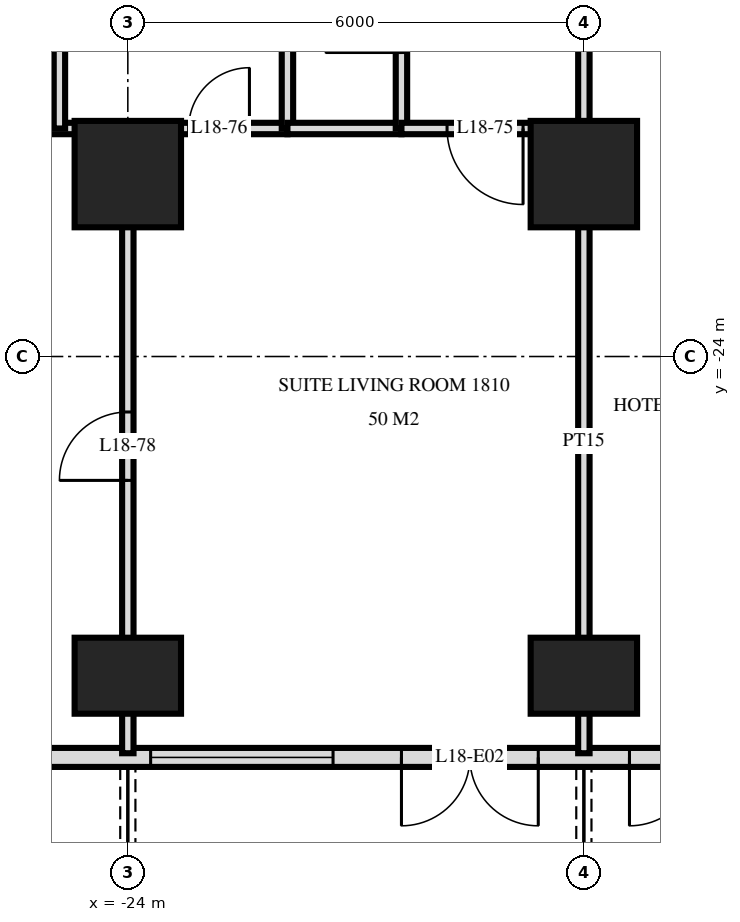
"""IFC4 building model, lengths in metres.
Left out: names, types, materials, properties, quantities, classifications, styles, units other than length and angle.
Written with IfcOpenShell. Run it as: python <this file> out.ifc"""

import sys

from ifc_helpers import new_model, si_unit, direction, frame, frame_2d, origin, origin_2d, place, context, subcontext, project, spatial, rectangle, extrude, element, fill, save


model = new_model("IFC4")
c1 = context("Model", 3, precision=1e-05, world=origin(), true_north=direction((0.0, 1.0)))
c2 = subcontext(c1, "Body", "Model", "MODEL_VIEW")
j1 = project(units=[si_unit("LENGTHUNIT", "METRE"), si_unit("PLANEANGLEUNIT", "RADIAN")], contexts=[c1])
p1 = place(None, origin())
s1 = spatial("IfcSite", under=j1, at=p1, CompositionType="ELEMENT")
p2 = place(p1, origin())
s2 = spatial("IfcBuilding", under=s1, at=p2, CompositionType="ELEMENT")
p3 = place(p2, frame((0.0, 0.0, 74.4)))
s3 = spatial("IfcBuildingStorey", under=s2, at=p3, CompositionType="ELEMENT", Elevation=74.4)
p4 = place(p3, frame((-24.0, -28.2, 0.0), z_axis=(0.0, 0.0, 1.0), x_axis=(1.0, 0.0, 0.0)))
e1 = element("IfcColumn", 1, at=p4, inside=s3, PredefinedType="COLUMN", context=c2, shape_type="SweptSolid", body=[
    extrude(rectangle(XDim=1.4, YDim=1.0, at=origin_2d()), origin(), (0.0, 0.0, 1.0), 3.6),
])
p5 = place(p3, frame((-24.0, -21.6, 0.0), z_axis=(0.0, 0.0, 1.0), x_axis=(1.0, 0.0, 0.0)))
e2 = element("IfcColumn", 2, at=p5, inside=s3, PredefinedType="COLUMN", context=c2, shape_type="SweptSolid", body=[
    extrude(rectangle(XDim=1.4, YDim=1.4, at=origin_2d()), origin(), (0.0, 0.0, 1.0), 3.6),
])
p6 = place(p3, frame((-18.0, -28.2, 0.0), z_axis=(0.0, 0.0, 1.0), x_axis=(1.0, 0.0, 0.0)))
e3 = element("IfcColumn", 3, at=p6, inside=s3, PredefinedType="COLUMN", context=c2, shape_type="SweptSolid", body=[
    extrude(rectangle(XDim=1.4, YDim=1.0, at=origin_2d()), origin(), (0.0, 0.0, 1.0), 3.6),
])
p7 = place(p3, frame((-18.0, -21.6, 0.0), z_axis=(0.0, 0.0, 1.0), x_axis=(1.0, 0.0, 0.0)))
e4 = element("IfcColumn", 4, at=p7, inside=s3, PredefinedType="COLUMN", context=c2, shape_type="SweptSolid", body=[
    extrude(rectangle(XDim=1.4, YDim=1.4, at=origin_2d()), origin(), (0.0, 0.0, 1.0), 3.6),
])
p8 = place(p3, frame((-28.775, -29.275, 0.0), z_axis=(0.0, 0.0, 1.0), x_axis=(1.0, 0.0, 0.0)))
e5 = element("IfcWall", 5, at=p8, inside=s3, PredefinedType="SOLIDWALL", context=c2, shape_type="SweptSolid", body=[
    extrude(rectangle(XDim=57.551, YDim=0.25, at=frame_2d((28.775, 0.0))), origin(), (0.0, 0.0, 1.0), 3.32),
])
p9 = place(p8, frame((0.575, 0.0, 0.0)))
e6 = element("IfcOpeningElement", 6, at=p9, cuts=e5, PredefinedType="OPENING", context=c2, shape_type="SweptSolid", body=[
    extrude(rectangle(XDim=1.8, YDim=2.4, at=frame_2d((0.9, 1.2))), frame((0.0, 0.135, 0.0), z_axis=(0.0, -1.0, 0.0), x_axis=(1.0, 0.0, 0.0)), (0.0, 0.0, 1.0), 0.27),
])
p10 = place(p8, frame((5.075, 0.0, 0.3)))
e7 = element("IfcOpeningElement", 7, at=p10, cuts=e5, PredefinedType="OPENING", context=c2, shape_type="SweptSolid", body=[
    extrude(rectangle(XDim=2.4, YDim=2.1, at=frame_2d((1.2, 1.05))), frame((0.0, 0.135, 0.0), z_axis=(0.0, -1.0, 0.0), x_axis=(1.0, 0.0, 0.0)), (0.0, 0.0, 1.0), 0.27),
])
p11 = place(p8, frame((8.375, 0.0, 0.0)))
e8 = element("IfcOpeningElement", 8, at=p11, cuts=e5, PredefinedType="OPENING", context=c2, shape_type="SweptSolid", body=[
    extrude(rectangle(XDim=1.8, YDim=2.4, at=frame_2d((0.9, 1.2))), frame((0.0, 0.135, 0.0), z_axis=(0.0, -1.0, 0.0), x_axis=(1.0, 0.0, 0.0)), (0.0, 0.0, 1.0), 0.27),
])
p12 = place(p8, frame((11.375, 0.0, 0.0)))
e9 = element("IfcOpeningElement", 9, at=p12, cuts=e5, PredefinedType="OPENING", context=c2, shape_type="SweptSolid", body=[
    extrude(rectangle(XDim=1.8, YDim=2.4, at=frame_2d((0.9, 1.2))), frame((0.0, 0.135, 0.0), z_axis=(0.0, -1.0, 0.0), x_axis=(1.0, 0.0, 0.0)), (0.0, 0.0, 1.0), 0.27),
])
p13 = place(p8, frame((14.075, 0.0, 0.3)))
e10 = element("IfcOpeningElement", 10, at=p13, cuts=e5, PredefinedType="OPENING", context=c2, shape_type="SweptSolid", body=[
    extrude(rectangle(XDim=2.4, YDim=2.1, at=frame_2d((1.2, 1.05))), frame((0.0, 0.135, 0.0), z_axis=(0.0, -1.0, 0.0), x_axis=(1.0, 0.0, 0.0)), (0.0, 0.0, 1.0), 0.27),
])
p14 = place(p8, frame((17.375, 0.0, 0.0)))
e11 = element("IfcOpeningElement", 11, at=p14, cuts=e5, PredefinedType="OPENING", context=c2, shape_type="SweptSolid", body=[
    extrude(rectangle(XDim=1.8, YDim=2.4, at=frame_2d((0.9, 1.2))), frame((0.0, 0.135, 0.0), z_axis=(0.0, -1.0, 0.0), x_axis=(1.0, 0.0, 0.0)), (0.0, 0.0, 1.0), 0.27),
])
p15 = place(p8, frame((20.075, 0.0, 0.3)))
e12 = element("IfcOpeningElement", 12, at=p15, cuts=e5, PredefinedType="OPENING", context=c2, shape_type="SweptSolid", body=[
    extrude(rectangle(XDim=2.4, YDim=2.1, at=frame_2d((1.2, 1.05))), frame((0.0, 0.135, 0.0), z_axis=(0.0, -1.0, 0.0), x_axis=(1.0, 0.0, 0.0)), (0.0, 0.0, 1.0), 0.27),
])
p16 = place(p8, frame((23.075, 0.0, 0.3)))
e13 = element("IfcOpeningElement", 13, at=p16, cuts=e5, PredefinedType="OPENING", context=c2, shape_type="SweptSolid", body=[
    extrude(rectangle(XDim=2.4, YDim=2.1, at=frame_2d((1.2, 1.05))), frame((0.0, 0.135, 0.0), z_axis=(0.0, -1.0, 0.0), x_axis=(1.0, 0.0, 0.0)), (0.0, 0.0, 1.0), 0.27),
])
p17 = place(p8, frame((26.375, 0.0, 0.0)))
e14 = element("IfcOpeningElement", 14, at=p17, cuts=e5, PredefinedType="OPENING", context=c2, shape_type="SweptSolid", body=[
    extrude(rectangle(XDim=1.8, YDim=2.4, at=frame_2d((0.9, 1.2))), frame((0.0, 0.135, 0.0), z_axis=(0.0, -1.0, 0.0), x_axis=(1.0, 0.0, 0.0)), (0.0, 0.0, 1.0), 0.27),
])
p18 = place(p8, frame((29.375, 0.0, 0.0)))
e15 = element("IfcOpeningElement", 15, at=p18, cuts=e5, PredefinedType="OPENING", context=c2, shape_type="SweptSolid", body=[
    extrude(rectangle(XDim=1.8, YDim=2.4, at=frame_2d((0.9, 1.2))), frame((0.0, 0.135, 0.0), z_axis=(0.0, -1.0, 0.0), x_axis=(1.0, 0.0, 0.0)), (0.0, 0.0, 1.0), 0.27),
])
p19 = place(p8, frame((32.075, 0.0, 0.3)))
e16 = element("IfcOpeningElement", 16, at=p19, cuts=e5, PredefinedType="OPENING", context=c2, shape_type="SweptSolid", body=[
    extrude(rectangle(XDim=2.4, YDim=2.1, at=frame_2d((1.2, 1.05))), frame((0.0, 0.135, 0.0), z_axis=(0.0, -1.0, 0.0), x_axis=(1.0, 0.0, 0.0)), (0.0, 0.0, 1.0), 0.27),
])
p20 = place(p8, frame((35.375, 0.0, 0.0)))
e17 = element("IfcOpeningElement", 17, at=p20, cuts=e5, PredefinedType="OPENING", context=c2, shape_type="SweptSolid", body=[
    extrude(rectangle(XDim=1.8, YDim=2.4, at=frame_2d((0.9, 1.2))), frame((0.0, 0.135, 0.0), z_axis=(0.0, -1.0, 0.0), x_axis=(1.0, 0.0, 0.0)), (0.0, 0.0, 1.0), 0.27),
])
p21 = place(p8, frame((38.075, 0.0, 0.3)))
e18 = element("IfcOpeningElement", 18, at=p21, cuts=e5, PredefinedType="OPENING", context=c2, shape_type="SweptSolid", body=[
    extrude(rectangle(XDim=2.4, YDim=2.1, at=frame_2d((1.2, 1.05))), frame((0.0, 0.135, 0.0), z_axis=(0.0, -1.0, 0.0), x_axis=(1.0, 0.0, 0.0)), (0.0, 0.0, 1.0), 0.27),
])
p22 = place(p8, frame((41.075, 0.0, 0.3)))
e19 = element("IfcOpeningElement", 19, at=p22, cuts=e5, PredefinedType="OPENING", context=c2, shape_type="SweptSolid", body=[
    extrude(rectangle(XDim=2.4, YDim=2.1, at=frame_2d((1.2, 1.05))), frame((0.0, 0.135, 0.0), z_axis=(0.0, -1.0, 0.0), x_axis=(1.0, 0.0, 0.0)), (0.0, 0.0, 1.0), 0.27),
])
p23 = place(p8, frame((44.375, 0.0, 0.0)))
e20 = element("IfcOpeningElement", 20, at=p23, cuts=e5, PredefinedType="OPENING", context=c2, shape_type="SweptSolid", body=[
    extrude(rectangle(XDim=1.8, YDim=2.4, at=frame_2d((0.9, 1.2))), frame((0.0, 0.135, 0.0), z_axis=(0.0, -1.0, 0.0), x_axis=(1.0, 0.0, 0.0)), (0.0, 0.0, 1.0), 0.27),
])
p24 = place(p8, frame((47.075, 0.0, 0.3)))
e21 = element("IfcOpeningElement", 21, at=p24, cuts=e5, PredefinedType="OPENING", context=c2, shape_type="SweptSolid", body=[
    extrude(rectangle(XDim=2.4, YDim=2.1, at=frame_2d((1.2, 1.05))), frame((0.0, 0.135, 0.0), z_axis=(0.0, -1.0, 0.0), x_axis=(1.0, 0.0, 0.0)), (0.0, 0.0, 1.0), 0.27),
])
p25 = place(p8, frame((50.375, 0.0, 0.0)))
e22 = element("IfcOpeningElement", 22, at=p25, cuts=e5, PredefinedType="OPENING", context=c2, shape_type="SweptSolid", body=[
    extrude(rectangle(XDim=1.8, YDim=2.4, at=frame_2d((0.9, 1.2))), frame((0.0, 0.135, 0.0), z_axis=(0.0, -1.0, 0.0), x_axis=(1.0, 0.0, 0.0)), (0.0, 0.0, 1.0), 0.27),
])
p26 = place(p8, frame((53.375, 0.0, 0.0)))
e23 = element("IfcOpeningElement", 23, at=p26, cuts=e5, PredefinedType="OPENING", context=c2, shape_type="SweptSolid", body=[
    extrude(rectangle(XDim=1.8, YDim=2.4, at=frame_2d((0.9, 1.2))), frame((0.0, 0.135, 0.0), z_axis=(0.0, -1.0, 0.0), x_axis=(1.0, 0.0, 0.0)), (0.0, 0.0, 1.0), 0.27),
])
p27 = place(p3, frame((-18.0, -21.0, 0.0), z_axis=(0.0, 0.0, 1.0), x_axis=(0.0, 1.0, 0.0)))
e24 = element("IfcWall", 24, at=p27, inside=s3, PredefinedType="PARTITIONING", context=c2, shape_type="SweptSolid", body=[
    extrude(rectangle(XDim=3.0, YDim=0.15, at=frame_2d((1.5, 0.0))), origin(), (0.0, 0.0, 1.0), 3.32),
])
p28 = place(p3, frame((-18.0, -29.22, 0.0), z_axis=(0.0, 0.0, 1.0), x_axis=(0.0, 1.0, 0.0)))
e25 = element("IfcWall", 25, at=p28, inside=s3, PredefinedType="PARTITIONING", context=c2, shape_type="SweptSolid", body=[
    extrude(rectangle(XDim=8.22, YDim=0.15, at=frame_2d((4.11, 0.0))), origin(), (0.0, 0.0, 1.0), 3.32),
])
p29 = place(p3, frame((-20.4, -21.0, 0.0), z_axis=(0.0, 0.0, 1.0), x_axis=(0.0, 1.0, 0.0)))
e26 = element("IfcWall", 26, at=p29, inside=s3, PredefinedType="PARTITIONING", context=c2, shape_type="SweptSolid", body=[
    extrude(rectangle(XDim=3.0, YDim=0.15, at=frame_2d((1.5, 0.0))), origin(), (0.0, 0.0, 1.0), 3.32),
])
p30 = place(p29, frame((1.0, 0.0, 0.0)))
e27 = element("IfcOpeningElement", 27, at=p30, cuts=e26, PredefinedType="OPENING", context=c2, shape_type="SweptSolid", body=[
    extrude(rectangle(XDim=1.0, YDim=2.1, at=frame_2d((0.5, 1.05))), frame((0.0, 0.085, 0.0), z_axis=(0.0, -1.0, 0.0), x_axis=(1.0, 0.0, 0.0)), (0.0, 0.0, 1.0), 0.17),
])
p31 = place(p3, frame((-21.9, -21.0, 0.0), z_axis=(0.0, 0.0, 1.0), x_axis=(0.0, 1.0, 0.0)))
e28 = element("IfcWall", 28, at=p31, inside=s3, PredefinedType="PLUMBINGWALL", context=c2, shape_type="SweptSolid", body=[
    extrude(rectangle(XDim=3.0, YDim=0.15, at=frame_2d((1.5, 0.0))), origin(), (0.0, 0.0, 1.0), 3.32),
])
p32 = place(p3, frame((-24.0, -29.22, 0.0), z_axis=(0.0, 0.0, 1.0), x_axis=(0.0, 1.0, 0.0)))
e29 = element("IfcWall", 29, at=p32, inside=s3, PredefinedType="PARTITIONING", context=c2, shape_type="SweptSolid", body=[
    extrude(rectangle(XDim=8.22, YDim=0.15, at=frame_2d((4.11, 0.0))), origin(), (0.0, 0.0, 1.0), 3.32),
])
p33 = place(p32, frame((3.59, 0.0, 0.0)))
e30 = element("IfcOpeningElement", 30, at=p33, cuts=e29, PredefinedType="OPENING", context=c2, shape_type="SweptSolid", body=[
    extrude(rectangle(XDim=0.9, YDim=2.1, at=frame_2d((0.45, 1.05))), frame((0.0, 0.085, 0.0), z_axis=(0.0, -1.0, 0.0), x_axis=(1.0, 0.0, 0.0)), (0.0, 0.0, 1.0), 0.17),
])
p34 = place(p3, frame((-24.9, -21.0, 0.0), z_axis=(0.0, 0.0, 1.0), x_axis=(0.0, 1.0, 0.0)))
e31 = element("IfcWall", 31, at=p34, inside=s3, PredefinedType="PARTITIONING", context=c2, shape_type="SweptSolid", body=[
    extrude(rectangle(XDim=3.0, YDim=0.15, at=frame_2d((1.5, 0.0))), origin(), (0.0, 0.0, 1.0), 3.32),
])
p35 = place(p3, frame((-20.4, -21.0, 0.0), z_axis=(0.0, 0.0, 1.0), x_axis=(1.0, 0.0, 0.0)))
e32 = element("IfcWall", 32, at=p35, inside=s3, PredefinedType="PARTITIONING", context=c2, shape_type="SweptSolid", body=[
    extrude(rectangle(XDim=2.4, YDim=0.15, at=frame_2d((1.2, 0.0))), origin(), (0.0, 0.0, 1.0), 3.32),
])
p36 = place(p35, frame((0.6, 0.0, 0.0)))
e33 = element("IfcOpeningElement", 33, at=p36, cuts=e32, PredefinedType="OPENING", context=c2, shape_type="SweptSolid", body=[
    extrude(rectangle(XDim=1.0, YDim=2.1, at=frame_2d((0.5, 1.05))), frame((0.0, 0.085, 0.0), z_axis=(0.0, -1.0, 0.0), x_axis=(1.0, 0.0, 0.0)), (0.0, 0.0, 1.0), 0.17),
])
p37 = place(p3, frame((-33.12, -21.0, 0.0), z_axis=(0.0, 0.0, 1.0), x_axis=(1.0, 0.0, 0.0)))
e34 = element("IfcWall", 34, at=p37, inside=s3, PredefinedType="PARTITIONING", context=c2, shape_type="SweptSolid", body=[
    extrude(rectangle(XDim=11.22, YDim=0.15, at=frame_2d((5.61, 0.0))), origin(), (0.0, 0.0, 1.0), 3.32),
])
p38 = place(p37, frame((9.92, 0.0, 0.0)))
e35 = element("IfcOpeningElement", 35, at=p38, cuts=e34, PredefinedType="OPENING", context=c2, shape_type="SweptSolid", body=[
    extrude(rectangle(XDim=0.8, YDim=2.1, at=frame_2d((0.4, 1.05))), frame((0.0, 0.085, 0.0), z_axis=(0.0, -1.0, 0.0), x_axis=(1.0, 0.0, 0.0)), (0.0, 0.0, 1.0), 0.17),
])
p39 = place(p37, frame((3.92, 0.0, 0.0)))
e36 = element("IfcOpeningElement", 36, at=p39, cuts=e34, PredefinedType="OPENING", context=c2, shape_type="SweptSolid", body=[
    extrude(rectangle(XDim=0.9, YDim=2.1, at=frame_2d((0.45, 1.05))), frame((0.0, 0.085, 0.0), z_axis=(0.0, -1.0, 0.0), x_axis=(1.0, 0.0, 0.0)), (0.0, 0.0, 1.0), 0.17),
])
p40 = place(p3, frame((-21.9, -21.0, 0.0), z_axis=(0.0, 0.0, 1.0), x_axis=(1.0, 0.0, 0.0)))
e37 = element("IfcWall", 37, at=p40, inside=s3, PredefinedType="PLUMBINGWALL", context=c2, shape_type="SweptSolid", body=[
    extrude(rectangle(XDim=1.5, YDim=0.15, at=frame_2d((0.75, 0.0))), origin(), (0.0, 0.0, 1.0), 3.32),
])
p41 = place(p10, origin())
e38 = element("IfcWindow", 38, at=p41, inside=s3, PartitioningType="SINGLE_PANEL", PredefinedType="WINDOW", context=c2, shape_type="SweptSolid", body=[
    extrude(rectangle(XDim=2.4, YDim=2.1, at=frame_2d((1.2, 1.05))), frame((0.0, 0.03, 0.0), z_axis=(0.0, -1.0, 0.0), x_axis=(1.0, 0.0, 0.0)), (0.0, 0.0, 1.0), 0.06),
])
fill(e7, e38)
p42 = place(p11, frame((0.9, 0.0, 0.0), z_axis=(0.0, 0.0, 1.0), x_axis=(-1.0, 0.0, 0.0)))
e39 = element("IfcDoor", 39, at=p42, inside=s3, OperationType="DOUBLE_DOOR_SINGLE_SWING", PredefinedType="DOOR", context=c2, shape_type="SweptSolid", body=[
    extrude(rectangle(XDim=1.8, YDim=2.4, at=frame_2d((0.0, 1.2))), frame((0.0, -0.025, 0.0), z_axis=(0.0, 1.0, 0.0), x_axis=(-1.0, 0.0, 0.0)), (0.0, 0.0, 1.0), 0.05),
])
fill(e8, e39)
p43 = place(p12, frame((0.9, 0.0, 0.0), z_axis=(0.0, 0.0, 1.0), x_axis=(-1.0, 0.0, 0.0)))
e40 = element("IfcDoor", 40, at=p43, inside=s3, OperationType="DOUBLE_DOOR_SINGLE_SWING", PredefinedType="DOOR", context=c2, shape_type="SweptSolid", body=[
    extrude(rectangle(XDim=1.8, YDim=2.4, at=frame_2d((0.0, 1.2))), frame((0.0, -0.025, 0.0), z_axis=(0.0, 1.0, 0.0), x_axis=(-1.0, 0.0, 0.0)), (0.0, 0.0, 1.0), 0.05),
])
fill(e9, e40)
p44 = place(p36, frame((0.5, 0.0, 0.0), z_axis=(0.0, 0.0, 1.0), x_axis=(-1.0, 0.0, 0.0)))
e41 = element("IfcDoor", 41, at=p44, inside=s3, OperationType="SINGLE_SWING_RIGHT", PredefinedType="DOOR", context=c2, shape_type="SweptSolid", body=[
    extrude(rectangle(XDim=1.0, YDim=2.1, at=frame_2d((0.0, 1.05))), frame((0.0, -0.025, 0.0), z_axis=(0.0, 1.0, 0.0), x_axis=(-1.0, 0.0, 0.0)), (0.0, 0.0, 1.0), 0.05),
])
fill(e33, e41)
p45 = place(p38, origin())
e42 = element("IfcDoor", 42, at=p45, inside=s3, OperationType="SINGLE_SWING_LEFT", PredefinedType="DOOR", context=c2, shape_type="SweptSolid", body=[
    extrude(rectangle(XDim=0.8, YDim=2.1, at=frame_2d((0.4, 1.05))), frame((0.0, 0.025, 0.0), z_axis=(0.0, -1.0, 0.0), x_axis=(1.0, 0.0, 0.0)), (0.0, 0.0, 1.0), 0.05),
])
fill(e35, e42)
p46 = place(p33, origin())
e43 = element("IfcDoor", 43, at=p46, inside=s3, OperationType="SINGLE_SWING_RIGHT", PredefinedType="DOOR", context=c2, shape_type="SweptSolid", body=[
    extrude(rectangle(XDim=0.9, YDim=2.1, at=frame_2d((0.45, 1.05))), frame((0.0, 0.025, 0.0), z_axis=(0.0, -1.0, 0.0), x_axis=(1.0, 0.0, 0.0)), (0.0, 0.0, 1.0), 0.05),
])
fill(e30, e43)
save(model, sys.argv[1])
